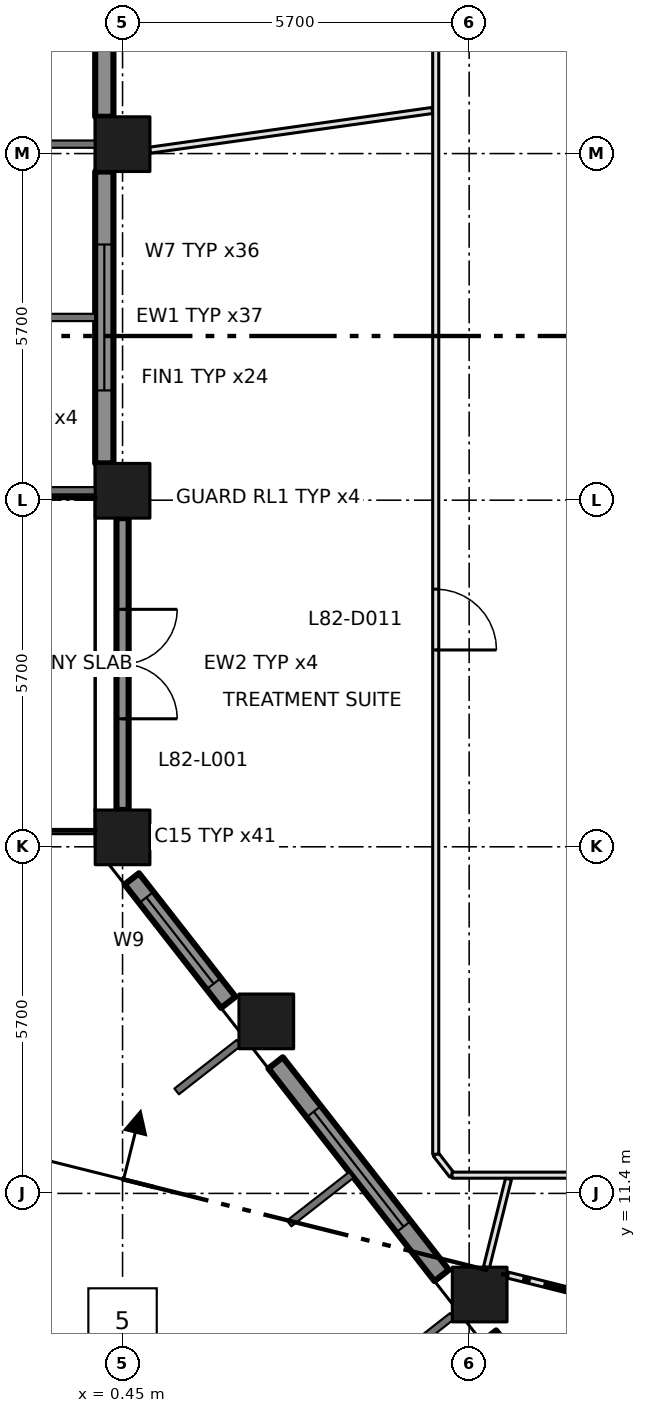
"""IFC4 building model, lengths in metres.
Left out: names, types, materials, properties, quantities, classifications, styles, units other than length and angle.
Written with IfcOpenShell. Run it as: python <this file> out.ifc"""

import sys

from ifc_helpers import new_model, si_unit, direction, frame, frame_2d, origin, origin_2d, place, context, subcontext, project, spatial, rectangle, extrude, element, fill, save


model = new_model("IFC4")
c1 = context("Model", 3, precision=1e-05, world=origin(), true_north=direction((0.0, 1.0)))
c2 = subcontext(c1, "Body", "Model", "MODEL_VIEW")
j1 = project(units=[si_unit("LENGTHUNIT", "METRE"), si_unit("PLANEANGLEUNIT", "RADIAN")], contexts=[c1])
p1 = place(None, origin())
s1 = spatial("IfcSite", under=j1, at=p1, CompositionType="ELEMENT")
p2 = place(p1, origin())
s2 = spatial("IfcBuilding", under=s1, at=p2, CompositionType="ELEMENT")
p3 = place(p2, frame((0.0, 0.0, 358.2)))
s3 = spatial("IfcBuildingStorey", under=s2, at=p3, CompositionType="ELEMENT", Elevation=358.2)
for number, where, z_axis, x_axis in (
    (1, (0.45, 17.255, 0.0), (0.0, 0.0, 1.0), (1.0, 0.0, 0.0)),
    (2, (0.45, 22.955, 0.0), (0.0, 0.0, 1.0), (1.0, 0.0, 0.0)),
    (3, (0.45, 28.655, 0.0), (0.0, 0.0, 1.0), (1.0, 0.0, 0.0)),
    (4, (6.323, 9.737, 0.0), (0.0, 0.0, 1.0), (1.0, 0.0, 0.0)),
    (5, (2.814, 14.229, 0.0), (0.0, 0.0, 1.0), (1.0, 0.0, 0.0)),
):
    element("IfcColumn", number, at=place(p3, frame(where, z_axis=z_axis, x_axis=x_axis)), inside=s3, PredefinedType="COLUMN", context=c2, shape_type="SweptSolid", body=[
        extrude(rectangle(XDim=0.9, YDim=0.9, at=origin_2d()), origin(), (0.0, 0.0, 1.0), 4.2),
    ])
p4 = place(p3, frame((0.15, 33.905, 0.0), z_axis=(0.0, 0.0, 1.0), x_axis=(0.0, -1.0, 0.0)))
e6 = element("IfcWall", 6, at=p4, inside=s3, PredefinedType="SOLIDWALL", context=c2, shape_type="SweptSolid", body=[
    extrude(rectangle(XDim=4.8, YDim=0.3, at=frame_2d((2.4, 0.0))), origin(), (0.0, 0.0, 1.0), 3.2),
])
p5 = place(p4, frame((1.2, 0.0, 0.8)))
e7 = element("IfcOpeningElement", 7, at=p5, cuts=e6, PredefinedType="OPENING", context=c2, shape_type="SweptSolid", body=[
    extrude(rectangle(XDim=2.4, YDim=2.1, at=frame_2d((1.2, 1.05))), frame((0.0, 0.16, 0.0), z_axis=(0.0, -1.0, 0.0), x_axis=(1.0, 0.0, 0.0)), (0.0, 0.0, 1.0), 0.32),
])
p6 = place(p3, frame((0.15, 28.205, 0.0), z_axis=(0.0, 0.0, 1.0), x_axis=(0.0, -1.0, 0.0)))
e8 = element("IfcWall", 8, at=p6, inside=s3, PredefinedType="SOLIDWALL", context=c2, shape_type="SweptSolid", body=[
    extrude(rectangle(XDim=4.8, YDim=0.3, at=frame_2d((2.4, 0.0))), origin(), (0.0, 0.0, 1.0), 3.2),
])
p7 = place(p6, frame((1.2, 0.0, 0.8)))
e9 = element("IfcOpeningElement", 9, at=p7, cuts=e8, PredefinedType="OPENING", context=c2, shape_type="SweptSolid", body=[
    extrude(rectangle(XDim=2.4, YDim=2.1, at=frame_2d((1.2, 1.05))), frame((0.0, 0.16, 0.0), z_axis=(0.0, -1.0, 0.0), x_axis=(1.0, 0.0, 0.0)), (0.0, 0.0, 1.0), 0.32),
])
p8 = place(p3, frame((0.45, 22.505, 0.0), z_axis=(0.0, 0.0, 1.0), x_axis=(0.0, -1.0, 0.0)))
e10 = element("IfcWall", 10, at=p8, inside=s3, PredefinedType="SOLIDWALL", context=c2, shape_type="SweptSolid", body=[
    extrude(rectangle(XDim=4.799, YDim=0.2, at=frame_2d((2.399, 0.0))), origin(), (0.0, 0.0, 1.0), 3.2),
])
p9 = place(p8, frame((1.5, 0.0, 0.0)))
e11 = element("IfcOpeningElement", 11, at=p9, cuts=e10, PredefinedType="OPENING", context=c2, shape_type="SweptSolid", body=[
    extrude(rectangle(XDim=1.8, YDim=2.9, at=frame_2d((0.9, 1.45))), frame((0.0, 0.11, 0.0), z_axis=(0.0, -1.0, 0.0), x_axis=(1.0, 0.0, 0.0)), (0.0, 0.0, 1.0), 0.22),
])
p10 = place(p3, frame((0.602, 16.573, 0.0), z_axis=(0.0, 0.0, 1.0), x_axis=(0.61568999437, -0.787988471256, 0.0)))
e12 = element("IfcWall", 12, at=p10, inside=s3, PredefinedType="SOLIDWALL", context=c2, shape_type="SweptSolid", body=[
    extrude(rectangle(XDim=2.577, YDim=0.3, at=frame_2d((1.289, 0.0))), origin(), (0.0, 0.0, 1.0), 3.2),
])
p11 = place(p10, frame((0.388, 0.0, 0.8)))
e13 = element("IfcOpeningElement", 13, at=p11, cuts=e12, PredefinedType="OPENING", context=c2, shape_type="SweptSolid", body=[
    extrude(rectangle(XDim=1.8, YDim=2.1, at=frame_2d((0.9, 1.05))), frame((0.0, 0.16, 0.0), z_axis=(0.0, -1.0, 0.0), x_axis=(1.0, 0.0, 0.0)), (0.0, 0.0, 1.0), 0.32),
])
p12 = place(p3, frame((2.967, 13.547, 0.0), z_axis=(0.0, 0.0, 1.0), x_axis=(0.615486001463, -0.788147817356, 0.0)))
e14 = element("IfcWall", 14, at=p12, inside=s3, PredefinedType="SOLIDWALL", context=c2, shape_type="SweptSolid", body=[
    extrude(rectangle(XDim=4.437, YDim=0.3, at=frame_2d((2.219, 0.0))), origin(), (0.0, 0.0, 1.0), 3.2),
])
p13 = place(p12, frame((1.018, 0.0, 0.8)))
e15 = element("IfcOpeningElement", 15, at=p13, cuts=e14, PredefinedType="OPENING", context=c2, shape_type="SweptSolid", body=[
    extrude(rectangle(XDim=2.4, YDim=2.1, at=frame_2d((1.2, 1.05))), frame((0.0, 0.16, 0.0), z_axis=(0.0, -1.0, 0.0), x_axis=(1.0, 0.0, 0.0)), (0.0, 0.0, 1.0), 0.32),
])
p14 = place(p3, frame((6.476, 9.055, 0.0), z_axis=(0.0, 0.0, 1.0), x_axis=(0.615649380255, -0.788020203162, 0.0)))
e16 = element("IfcWall", 16, at=p14, inside=s3, PredefinedType="SOLIDWALL", context=c2, shape_type="SweptSolid", body=[
    extrude(rectangle(XDim=4.438, YDim=0.3, at=frame_2d((2.219, 0.0))), origin(), (0.0, 0.0, 1.0), 3.2),
])
p15 = place(p14, frame((1.019, 0.0, 0.8)))
e17 = element("IfcOpeningElement", 17, at=p15, cuts=e16, PredefinedType="OPENING", context=c2, shape_type="SweptSolid", body=[
    extrude(rectangle(XDim=2.4, YDim=2.1, at=frame_2d((1.2, 1.05))), frame((0.0, 0.16, 0.0), z_axis=(0.0, -1.0, 0.0), x_axis=(1.0, 0.0, 0.0)), (0.0, 0.0, 1.0), 0.32),
])
p16 = place(p3, frame((5.6, 12.044, 0.0), z_axis=(0.0, 0.0, 1.0), x_axis=(0.614328236968, -0.789050579661, 0.0)))
e18 = element("IfcWall", 18, at=p16, inside=s3, PredefinedType="PARTITIONING", context=c2, shape_type="SweptSolid", body=[
    extrude(rectangle(XDim=0.436, YDim=0.1, at=frame_2d((0.218, 0.0))), origin(), (0.0, 0.0, 1.0), 3.9),
])
p17 = place(p3, frame((5.6, 39.3, 0.0), z_axis=(0.0, 0.0, 1.0), x_axis=(0.0, -1.0, 0.0)))
e19 = element("IfcWall", 19, at=p17, inside=s3, PredefinedType="PARTITIONING", context=c2, shape_type="SweptSolid", body=[
    extrude(rectangle(XDim=27.256, YDim=0.1, at=frame_2d((13.628, 0.0))), origin(), (0.0, 0.0, 1.0), 3.9),
])
p18 = place(p17, frame((17.963, 0.0, 0.0)))
e20 = element("IfcOpeningElement", 20, at=p18, cuts=e19, PredefinedType="OPENING", context=c2, shape_type="SweptSolid", body=[
    extrude(rectangle(XDim=1.0, YDim=2.1, at=frame_2d((0.5, 1.05))), frame((0.0, 0.06, 0.0), z_axis=(0.0, -1.0, 0.0), x_axis=(1.0, 0.0, 0.0)), (0.0, 0.0, 1.0), 0.12),
])
p19 = place(p3, frame((5.868, 11.7, 0.0), z_axis=(0.0, 0.0, 1.0), x_axis=(1.0, 0.0, 0.0)))
e21 = element("IfcWall", 21, at=p19, inside=s3, PredefinedType="PARTITIONING", context=c2, shape_type="SweptSolid", body=[
    extrude(rectangle(XDim=4.032, YDim=0.1, at=frame_2d((2.016, 0.0))), origin(), (0.0, 0.0, 1.0), 3.9),
])
p20 = place(p3, frame((5.543, 29.209, 0.0), z_axis=(0.0, 0.0, 1.0), x_axis=(-0.990252315106, -0.139285147908, 0.0)))
e22 = element("IfcWall", 22, at=p20, inside=s3, PredefinedType="PARTITIONING", context=c2, shape_type="SweptSolid", body=[
    extrude(rectangle(XDim=4.689, YDim=0.1, at=frame_2d((2.344, 0.0))), origin(), (0.0, 0.0, 1.0), 3.9),
])
p21 = place(p3, frame((6.797, 11.638, 0.0), z_axis=(0.0, 0.0, 1.0), x_axis=(-0.242113049408, -0.970248046278, 0.0)))
e23 = element("IfcWall", 23, at=p21, inside=s3, PredefinedType="PARTITIONING", context=c2, shape_type="SweptSolid", body=[
    extrude(rectangle(XDim=1.495, YDim=0.1, at=frame_2d((0.748, 0.0))), origin(), (0.0, 0.0, 1.0), 3.9),
])
p22 = place(p3, frame((8.72, 9.574, 0.0), z_axis=(0.0, 0.0, 1.0), x_axis=(-0.970221168815, 0.24222073318, 0.0)))
e24 = element("IfcWall", 24, at=p22, inside=s3, PredefinedType="PARTITIONING", context=c2, shape_type="SweptSolid", body=[
    extrude(rectangle(XDim=2.007, YDim=0.1, at=frame_2d((1.003, 0.0))), origin(), (0.0, 0.0, 1.0), 3.9),
])
p23 = place(p7, origin())
e25 = element("IfcWindow", 25, at=p23, inside=s3, PartitioningType="DOUBLE_PANEL_VERTICAL", PredefinedType="WINDOW", context=c2, shape_type="SweptSolid", body=[
    extrude(rectangle(XDim=2.4, YDim=2.1, at=frame_2d((1.2, 1.05))), frame((0.0, 0.03, 0.0), z_axis=(0.0, -1.0, 0.0), x_axis=(1.0, 0.0, 0.0)), (0.0, 0.0, 1.0), 0.06),
])
fill(e9, e25)
p24 = place(p9, origin())
e26 = element("IfcDoor", 26, at=p24, inside=s3, OperationType="DOUBLE_DOOR_SINGLE_SWING", PredefinedType="DOOR", context=c2, shape_type="SweptSolid", body=[
    extrude(rectangle(XDim=1.8, YDim=2.9, at=frame_2d((0.9, 1.45))), frame((0.0, 0.025, 0.0), z_axis=(0.0, -1.0, 0.0), x_axis=(1.0, 0.0, 0.0)), (0.0, 0.0, 1.0), 0.05),
])
fill(e11, e26)
p25 = place(p11, origin())
e27 = element("IfcWindow", 27, at=p25, inside=s3, PartitioningType="DOUBLE_PANEL_VERTICAL", PredefinedType="WINDOW", context=c2, shape_type="SweptSolid", body=[
    extrude(rectangle(XDim=1.8, YDim=2.1, at=frame_2d((0.9, 1.05))), frame((0.0, 0.03, 0.0), z_axis=(0.0, -1.0, 0.0), x_axis=(1.0, 0.0, 0.0)), (0.0, 0.0, 1.0), 0.06),
])
fill(e13, e27)
p26 = place(p13, origin())
e28 = element("IfcWindow", 28, at=p26, inside=s3, PartitioningType="DOUBLE_PANEL_VERTICAL", PredefinedType="WINDOW", context=c2, shape_type="SweptSolid", body=[
    extrude(rectangle(XDim=2.4, YDim=2.1, at=frame_2d((1.2, 1.05))), frame((0.0, 0.03, 0.0), z_axis=(0.0, -1.0, 0.0), x_axis=(1.0, 0.0, 0.0)), (0.0, 0.0, 1.0), 0.06),
])
fill(e15, e28)
p27 = place(p18, origin())
e29 = element("IfcDoor", 29, at=p27, inside=s3, OperationType="SINGLE_SWING_RIGHT", PredefinedType="DOOR", context=c2, shape_type="SweptSolid", body=[
    extrude(rectangle(XDim=1.0, YDim=2.1, at=frame_2d((0.5, 1.05))), frame((0.0, 0.025, 0.0), z_axis=(0.0, -1.0, 0.0), x_axis=(1.0, 0.0, 0.0)), (0.0, 0.0, 1.0), 0.05),
])
fill(e20, e29)
save(model, sys.argv[1])
